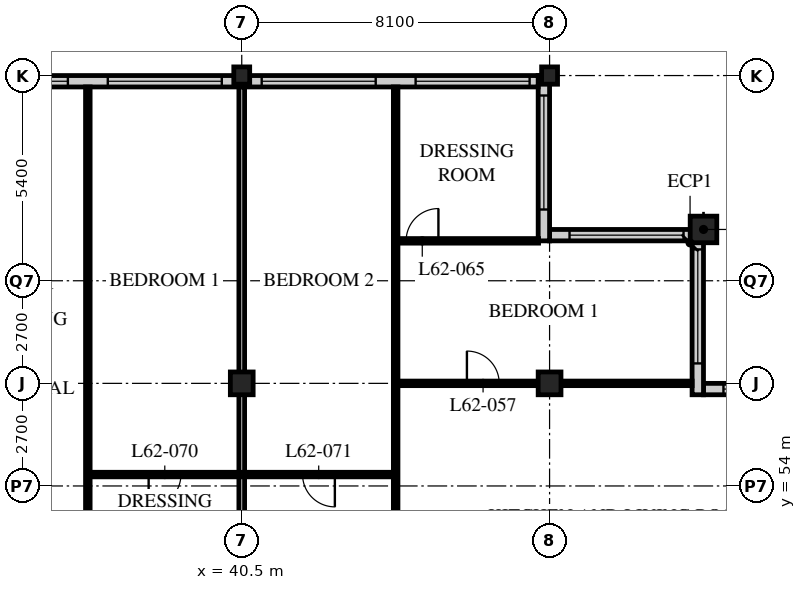
"""IFC4 building model, lengths in metres.
Left out: names, types, materials, properties, quantities, classifications, styles, units other than length and angle.
Written with IfcOpenShell. Run it as: python <this file> out.ifc"""

import sys

from ifc_helpers import new_model, si_unit, direction, frame, frame_2d, origin, origin_2d, place, context, subcontext, project, spatial, rectangle, hollow_rectangle, i_section, extrude, element, fill, save


model = new_model("IFC4")
c1 = context("Model", 3, precision=1e-05, world=origin(), true_north=direction((0.0, 1.0)))
c2 = subcontext(c1, "Body", "Model", "MODEL_VIEW")
j1 = project(units=[si_unit("LENGTHUNIT", "METRE"), si_unit("PLANEANGLEUNIT", "RADIAN")], contexts=[c1])
p1 = place(None, origin())
s1 = spatial("IfcSite", under=j1, at=p1, CompositionType="ELEMENT")
p2 = place(p1, origin())
s2 = spatial("IfcBuilding", under=s1, at=p2, CompositionType="ELEMENT")
p3 = place(p2, frame((0.0, 0.0, 242.4)))
s3 = spatial("IfcBuildingStorey", under=s2, at=p3, CompositionType="ELEMENT", Elevation=242.4)
p4 = place(p3, frame((40.5, 56.7, 0.0), z_axis=(0.0, 0.0, 1.0), x_axis=(1.0, 0.0, 0.0)))
e1 = element("IfcColumn", 1, at=p4, inside=s3, PredefinedType="COLUMN", context=c2, shape_type="SweptSolid", body=[
    extrude(hollow_rectangle(XDim=0.6, YDim=0.6, WallThickness=0.05, at=origin_2d()), origin(), (0.0, 0.0, 1.0), 3.9),
])
p5 = place(p3, frame((40.5, 64.8, 0.0), z_axis=(0.0, 0.0, 1.0), x_axis=(1.0, 0.0, 0.0)))
e2 = element("IfcColumn", 2, at=p5, inside=s3, PredefinedType="COLUMN", context=c2, shape_type="SweptSolid", body=[
    extrude(i_section(OverallWidth=0.418, OverallDepth=0.456, WebThickness=0.042, FlangeThickness=0.067, FilletRadius=0.015, at=origin_2d()), origin(), (0.0, 0.0, 1.0), 3.9),
])
p6 = place(p3, frame((48.6, 56.7, 0.0), z_axis=(0.0, 0.0, 1.0), x_axis=(1.0, 0.0, 0.0)))
e3 = element("IfcColumn", 3, at=p6, inside=s3, PredefinedType="COLUMN", context=c2, shape_type="SweptSolid", body=[
    extrude(hollow_rectangle(XDim=0.6, YDim=0.6, WallThickness=0.05, at=origin_2d()), origin(), (0.0, 0.0, 1.0), 3.9),
])
p7 = place(p3, frame((48.6, 64.8, 0.0), z_axis=(0.0, 0.0, 1.0), x_axis=(1.0, 0.0, 0.0)))
e4 = element("IfcColumn", 4, at=p7, inside=s3, PredefinedType="COLUMN", context=c2, shape_type="SweptSolid", body=[
    extrude(i_section(OverallWidth=0.418, OverallDepth=0.456, WebThickness=0.042, FlangeThickness=0.067, FilletRadius=0.015, at=origin_2d()), origin(), (0.0, 0.0, 1.0), 3.9),
])
p8 = place(p3, frame((52.65, 60.75, 0.0), z_axis=(0.0, 0.0, 1.0), x_axis=(1.0, 0.0, 0.0)))
e5 = element("IfcColumn", 5, at=p8, inside=s3, PredefinedType="COLUMN", context=c2, shape_type="SweptSolid", body=[
    extrude(hollow_rectangle(XDim=0.7, YDim=0.7, WallThickness=0.07, at=origin_2d()), origin(), (0.0, 0.0, 1.0), 3.9),
])
p9 = place(p3, frame((56.4, 56.55, 0.0), z_axis=(0.0, 0.0, 1.0), x_axis=(-1.0, 0.0, 0.0)))
e6 = element("IfcWall", 6, at=p9, inside=s3, PredefinedType="SOLIDWALL", context=c2, shape_type="SweptSolid", body=[
    extrude(rectangle(XDim=3.75, YDim=0.3, at=frame_2d((1.875, 0.0))), origin(), (0.0, 0.0, 1.0), 3.69),
])
p10 = place(p9, frame((0.225, 0.0, 0.6)))
e7 = element("IfcOpeningElement", 7, at=p10, cuts=e6, PredefinedType="OPENING", context=c2, shape_type="SweptSolid", body=[
    extrude(rectangle(XDim=3.0, YDim=2.3, at=frame_2d((1.5, 1.15))), frame((0.0, 0.16, 0.0), z_axis=(0.0, -1.0, 0.0), x_axis=(1.0, 0.0, 0.0)), (0.0, 0.0, 1.0), 0.32),
])
p11 = place(p3, frame((52.5, 56.4, 0.0), z_axis=(0.0, 0.0, 1.0), x_axis=(0.0, 1.0, 0.0)))
e8 = element("IfcWall", 8, at=p11, inside=s3, PredefinedType="SOLIDWALL", context=c2, shape_type="SweptSolid", body=[
    extrude(rectangle(XDim=4.35, YDim=0.3, at=frame_2d((2.175, 0.0))), origin(), (0.0, 0.0, 1.0), 3.69),
])
p12 = place(p11, frame((0.825, 0.0, 0.6)))
e9 = element("IfcOpeningElement", 9, at=p12, cuts=e8, PredefinedType="OPENING", context=c2, shape_type="SweptSolid", body=[
    extrude(rectangle(XDim=3.0, YDim=2.3, at=frame_2d((1.5, 1.15))), frame((0.0, 0.16, 0.0), z_axis=(0.0, -1.0, 0.0), x_axis=(1.0, 0.0, 0.0)), (0.0, 0.0, 1.0), 0.32),
])
p13 = place(p3, frame((52.35, 60.6, 0.0), z_axis=(0.0, 0.0, 1.0), x_axis=(-1.0, 0.0, 0.0)))
e10 = element("IfcWall", 10, at=p13, inside=s3, PredefinedType="SOLIDWALL", context=c2, shape_type="SweptSolid", body=[
    extrude(rectangle(XDim=3.75, YDim=0.3, at=frame_2d((1.875, 0.0))), origin(), (0.0, 0.0, 1.0), 3.69),
])
p14 = place(p13, frame((0.225, 0.0, 0.6)))
e11 = element("IfcOpeningElement", 11, at=p14, cuts=e10, PredefinedType="OPENING", context=c2, shape_type="SweptSolid", body=[
    extrude(rectangle(XDim=3.0, YDim=2.3, at=frame_2d((1.5, 1.15))), frame((0.0, 0.16, 0.0), z_axis=(0.0, -1.0, 0.0), x_axis=(1.0, 0.0, 0.0)), (0.0, 0.0, 1.0), 0.32),
])
p15 = place(p3, frame((48.45, 60.45, 0.0), z_axis=(0.0, 0.0, 1.0), x_axis=(0.0, 1.0, 0.0)))
e12 = element("IfcWall", 12, at=p15, inside=s3, PredefinedType="SOLIDWALL", context=c2, shape_type="SweptSolid", body=[
    extrude(rectangle(XDim=4.35, YDim=0.3, at=frame_2d((2.175, 0.0))), origin(), (0.0, 0.0, 1.0), 3.69),
])
p16 = place(p15, frame((0.825, 0.0, 0.6)))
e13 = element("IfcOpeningElement", 13, at=p16, cuts=e12, PredefinedType="OPENING", context=c2, shape_type="SweptSolid", body=[
    extrude(rectangle(XDim=3.0, YDim=2.3, at=frame_2d((1.5, 1.15))), frame((0.0, 0.16, 0.0), z_axis=(0.0, -1.0, 0.0), x_axis=(1.0, 0.0, 0.0)), (0.0, 0.0, 1.0), 0.32),
])
p17 = place(p3, frame((48.3, 64.65, 0.0), z_axis=(0.0, 0.0, 1.0), x_axis=(-1.0, 0.0, 0.0)))
e14 = element("IfcWall", 14, at=p17, inside=s3, PredefinedType="SOLIDWALL", context=c2, shape_type="SweptSolid", body=[
    extrude(rectangle(XDim=40.2, YDim=0.3, at=frame_2d((20.1, 0.0))), origin(), (0.0, 0.0, 1.0), 3.69),
])
p18 = place(p17, frame((0.225, 0.0, 0.6)))
e15 = element("IfcOpeningElement", 15, at=p18, cuts=e14, PredefinedType="OPENING", context=c2, shape_type="SweptSolid", body=[
    extrude(rectangle(XDim=3.0, YDim=2.3, at=frame_2d((1.5, 1.15))), frame((0.0, 0.16, 0.0), z_axis=(0.0, -1.0, 0.0), x_axis=(1.0, 0.0, 0.0)), (0.0, 0.0, 1.0), 0.32),
])
p19 = place(p17, frame((4.275, 0.0, 0.6)))
e16 = element("IfcOpeningElement", 16, at=p19, cuts=e14, PredefinedType="OPENING", context=c2, shape_type="SweptSolid", body=[
    extrude(rectangle(XDim=3.0, YDim=2.3, at=frame_2d((1.5, 1.15))), frame((0.0, 0.16, 0.0), z_axis=(0.0, -1.0, 0.0), x_axis=(1.0, 0.0, 0.0)), (0.0, 0.0, 1.0), 0.32),
])
p20 = place(p17, frame((8.325, 0.0, 0.6)))
e17 = element("IfcOpeningElement", 17, at=p20, cuts=e14, PredefinedType="OPENING", context=c2, shape_type="SweptSolid", body=[
    extrude(rectangle(XDim=3.0, YDim=2.3, at=frame_2d((1.5, 1.15))), frame((0.0, 0.16, 0.0), z_axis=(0.0, -1.0, 0.0), x_axis=(1.0, 0.0, 0.0)), (0.0, 0.0, 1.0), 0.32),
])
p21 = place(p17, frame((12.375, 0.0, 0.6)))
e18 = element("IfcOpeningElement", 18, at=p21, cuts=e14, PredefinedType="OPENING", context=c2, shape_type="SweptSolid", body=[
    extrude(rectangle(XDim=3.0, YDim=2.3, at=frame_2d((1.5, 1.15))), frame((0.0, 0.16, 0.0), z_axis=(0.0, -1.0, 0.0), x_axis=(1.0, 0.0, 0.0)), (0.0, 0.0, 1.0), 0.32),
])
p22 = place(p17, frame((16.425, 0.0, 0.6)))
e19 = element("IfcOpeningElement", 19, at=p22, cuts=e14, PredefinedType="OPENING", context=c2, shape_type="SweptSolid", body=[
    extrude(rectangle(XDim=3.0, YDim=2.3, at=frame_2d((1.5, 1.15))), frame((0.0, 0.16, 0.0), z_axis=(0.0, -1.0, 0.0), x_axis=(1.0, 0.0, 0.0)), (0.0, 0.0, 1.0), 0.32),
])
p23 = place(p17, frame((20.475, 0.0, 0.6)))
e20 = element("IfcOpeningElement", 20, at=p23, cuts=e14, PredefinedType="OPENING", context=c2, shape_type="SweptSolid", body=[
    extrude(rectangle(XDim=3.0, YDim=2.3, at=frame_2d((1.5, 1.15))), frame((0.0, 0.16, 0.0), z_axis=(0.0, -1.0, 0.0), x_axis=(1.0, 0.0, 0.0)), (0.0, 0.0, 1.0), 0.32),
])
p24 = place(p17, frame((24.525, 0.0, 0.6)))
e21 = element("IfcOpeningElement", 21, at=p24, cuts=e14, PredefinedType="OPENING", context=c2, shape_type="SweptSolid", body=[
    extrude(rectangle(XDim=3.0, YDim=2.3, at=frame_2d((1.5, 1.15))), frame((0.0, 0.16, 0.0), z_axis=(0.0, -1.0, 0.0), x_axis=(1.0, 0.0, 0.0)), (0.0, 0.0, 1.0), 0.32),
])
p25 = place(p17, frame((28.575, 0.0, 0.6)))
e22 = element("IfcOpeningElement", 22, at=p25, cuts=e14, PredefinedType="OPENING", context=c2, shape_type="SweptSolid", body=[
    extrude(rectangle(XDim=3.0, YDim=2.3, at=frame_2d((1.5, 1.15))), frame((0.0, 0.16, 0.0), z_axis=(0.0, -1.0, 0.0), x_axis=(1.0, 0.0, 0.0)), (0.0, 0.0, 1.0), 0.32),
])
p26 = place(p17, frame((32.625, 0.0, 0.6)))
e23 = element("IfcOpeningElement", 23, at=p26, cuts=e14, PredefinedType="OPENING", context=c2, shape_type="SweptSolid", body=[
    extrude(rectangle(XDim=3.0, YDim=2.3, at=frame_2d((1.5, 1.15))), frame((0.0, 0.16, 0.0), z_axis=(0.0, -1.0, 0.0), x_axis=(1.0, 0.0, 0.0)), (0.0, 0.0, 1.0), 0.32),
])
p27 = place(p17, frame((36.675, 0.0, 0.6)))
e24 = element("IfcOpeningElement", 24, at=p27, cuts=e14, PredefinedType="OPENING", context=c2, shape_type="SweptSolid", body=[
    extrude(rectangle(XDim=3.0, YDim=2.3, at=frame_2d((1.5, 1.15))), frame((0.0, 0.16, 0.0), z_axis=(0.0, -1.0, 0.0), x_axis=(1.0, 0.0, 0.0)), (0.0, 0.0, 1.0), 0.32),
])
for number, where, z_axis, x_axis in (
    (25, (36.45, 51.0, 0.0), (0.0, 0.0, 1.0), (0.0, 1.0, 0.0)),
    (26, (44.55, 51.0, 0.0), (0.0, 0.0, 1.0), (0.0, 1.0, 0.0)),
):
    element("IfcWall", number, at=place(p3, frame(where, z_axis=z_axis, x_axis=x_axis)), inside=s3, PredefinedType="PARTITIONING", context=c2, shape_type="SweptSolid", body=[
        extrude(rectangle(XDim=13.5, YDim=0.12, at=frame_2d((6.75, 0.0))), origin(), (0.0, 0.0, 1.0), 3.69),
    ])
p28 = place(p3, frame((44.55, 56.7, 0.0), z_axis=(0.0, 0.0, 1.0), x_axis=(1.0, 0.0, 0.0)))
e27 = element("IfcWall", 27, at=p28, inside=s3, PredefinedType="PARTITIONING", context=c2, shape_type="SweptSolid", body=[
    extrude(rectangle(XDim=7.8, YDim=0.12, at=frame_2d((3.9, 0.0))), origin(), (0.0, 0.0, 1.0), 2.928),
])
p29 = place(p28, frame((1.875, 0.0, 0.0)))
e28 = element("IfcOpeningElement", 28, at=p29, cuts=e27, PredefinedType="OPENING", context=c2, shape_type="SweptSolid", body=[
    extrude(rectangle(XDim=0.85, YDim=2.1, at=frame_2d((0.425, 1.05))), frame((0.0, 0.07, 0.0), z_axis=(0.0, -1.0, 0.0), x_axis=(1.0, 0.0, 0.0)), (0.0, 0.0, 1.0), 0.14),
])
p30 = place(p3, frame((40.5, 48.6, 0.0), z_axis=(0.0, 0.0, 1.0), x_axis=(0.0, 1.0, 0.0)))
e29 = element("IfcWall", 29, at=p30, inside=s3, PredefinedType="PARTITIONING", context=c2, shape_type="SweptSolid", body=[
    extrude(rectangle(XDim=15.9, YDim=0.15, at=frame_2d((7.95, 0.0))), origin(), (0.0, 0.0, 1.0), 2.928),
])
p31 = place(p3, frame((48.31, 60.45, 0.0), z_axis=(0.0, 0.0, 1.0), x_axis=(-1.0, 0.0, 0.0)))
e30 = element("IfcWall", 30, at=p31, inside=s3, PredefinedType="PARTITIONING", context=c2, shape_type="SweptSolid", body=[
    extrude(rectangle(XDim=3.76, YDim=0.12, at=frame_2d((1.88, 0.0))), origin(), (0.0, 0.0, 1.0), 3.69),
])
p32 = place(p31, frame((2.635, 0.0, 0.0)))
e31 = element("IfcOpeningElement", 31, at=p32, cuts=e30, PredefinedType="OPENING", context=c2, shape_type="SweptSolid", body=[
    extrude(rectangle(XDim=0.85, YDim=2.1, at=frame_2d((0.425, 1.05))), frame((0.0, 0.07, 0.0), z_axis=(0.0, -1.0, 0.0), x_axis=(1.0, 0.0, 0.0)), (0.0, 0.0, 1.0), 0.14),
])
p33 = place(p3, frame((36.45, 54.3, 0.0), z_axis=(0.0, 0.0, 1.0), x_axis=(1.0, 0.0, 0.0)))
e32 = element("IfcWall", 32, at=p33, inside=s3, PredefinedType="PARTITIONING", context=c2, shape_type="SweptSolid", body=[
    extrude(rectangle(XDim=8.1, YDim=0.12, at=frame_2d((4.05, 0.0))), origin(), (0.0, 0.0, 1.0), 3.69),
])
p34 = place(p33, frame((1.6, 0.0, 0.0)))
e33 = element("IfcOpeningElement", 33, at=p34, cuts=e32, PredefinedType="OPENING", context=c2, shape_type="SweptSolid", body=[
    extrude(rectangle(XDim=0.85, YDim=2.1, at=frame_2d((0.425, 1.05))), frame((0.0, 0.07, 0.0), z_axis=(0.0, -1.0, 0.0), x_axis=(1.0, 0.0, 0.0)), (0.0, 0.0, 1.0), 0.14),
])
p35 = place(p33, frame((5.65, 0.0, 0.0)))
e34 = element("IfcOpeningElement", 34, at=p35, cuts=e32, PredefinedType="OPENING", context=c2, shape_type="SweptSolid", body=[
    extrude(rectangle(XDim=0.85, YDim=2.1, at=frame_2d((0.425, 1.05))), frame((0.0, 0.07, 0.0), z_axis=(0.0, -1.0, 0.0), x_axis=(1.0, 0.0, 0.0)), (0.0, 0.0, 1.0), 0.14),
])
p36 = place(p10, origin())
e35 = element("IfcWindow", 35, at=p36, inside=s3, PartitioningType="SINGLE_PANEL", PredefinedType="WINDOW", context=c2, shape_type="SweptSolid", body=[
    extrude(rectangle(XDim=3.0, YDim=2.3, at=frame_2d((1.5, 1.15))), frame((0.0, 0.03, 0.0), z_axis=(0.0, -1.0, 0.0), x_axis=(1.0, 0.0, 0.0)), (0.0, 0.0, 1.0), 0.06),
])
fill(e7, e35)
p37 = place(p12, origin())
e36 = element("IfcWindow", 36, at=p37, inside=s3, PartitioningType="SINGLE_PANEL", PredefinedType="WINDOW", context=c2, shape_type="SweptSolid", body=[
    extrude(rectangle(XDim=3.0, YDim=2.3, at=frame_2d((1.5, 1.15))), frame((0.0, 0.03, 0.0), z_axis=(0.0, -1.0, 0.0), x_axis=(1.0, 0.0, 0.0)), (0.0, 0.0, 1.0), 0.06),
])
fill(e9, e36)
p38 = place(p14, origin())
e37 = element("IfcWindow", 37, at=p38, inside=s3, PartitioningType="SINGLE_PANEL", PredefinedType="WINDOW", context=c2, shape_type="SweptSolid", body=[
    extrude(rectangle(XDim=3.0, YDim=2.3, at=frame_2d((1.5, 1.15))), frame((0.0, 0.03, 0.0), z_axis=(0.0, -1.0, 0.0), x_axis=(1.0, 0.0, 0.0)), (0.0, 0.0, 1.0), 0.06),
])
fill(e11, e37)
p39 = place(p16, origin())
e38 = element("IfcWindow", 38, at=p39, inside=s3, PartitioningType="SINGLE_PANEL", PredefinedType="WINDOW", context=c2, shape_type="SweptSolid", body=[
    extrude(rectangle(XDim=3.0, YDim=2.3, at=frame_2d((1.5, 1.15))), frame((0.0, 0.03, 0.0), z_axis=(0.0, -1.0, 0.0), x_axis=(1.0, 0.0, 0.0)), (0.0, 0.0, 1.0), 0.06),
])
fill(e13, e38)
p40 = place(p18, origin())
e39 = element("IfcWindow", 39, at=p40, inside=s3, PartitioningType="SINGLE_PANEL", PredefinedType="WINDOW", context=c2, shape_type="SweptSolid", body=[
    extrude(rectangle(XDim=3.0, YDim=2.3, at=frame_2d((1.5, 1.15))), frame((0.0, 0.03, 0.0), z_axis=(0.0, -1.0, 0.0), x_axis=(1.0, 0.0, 0.0)), (0.0, 0.0, 1.0), 0.06),
])
fill(e15, e39)
p41 = place(p19, origin())
e40 = element("IfcWindow", 40, at=p41, inside=s3, PartitioningType="SINGLE_PANEL", PredefinedType="WINDOW", context=c2, shape_type="SweptSolid", body=[
    extrude(rectangle(XDim=3.0, YDim=2.3, at=frame_2d((1.5, 1.15))), frame((0.0, 0.03, 0.0), z_axis=(0.0, -1.0, 0.0), x_axis=(1.0, 0.0, 0.0)), (0.0, 0.0, 1.0), 0.06),
])
fill(e16, e40)
p42 = place(p20, origin())
e41 = element("IfcWindow", 41, at=p42, inside=s3, PartitioningType="SINGLE_PANEL", PredefinedType="WINDOW", context=c2, shape_type="SweptSolid", body=[
    extrude(rectangle(XDim=3.0, YDim=2.3, at=frame_2d((1.5, 1.15))), frame((0.0, 0.03, 0.0), z_axis=(0.0, -1.0, 0.0), x_axis=(1.0, 0.0, 0.0)), (0.0, 0.0, 1.0), 0.06),
])
fill(e17, e41)
p43 = place(p21, origin())
e42 = element("IfcWindow", 42, at=p43, inside=s3, PartitioningType="SINGLE_PANEL", PredefinedType="WINDOW", context=c2, shape_type="SweptSolid", body=[
    extrude(rectangle(XDim=3.0, YDim=2.3, at=frame_2d((1.5, 1.15))), frame((0.0, 0.03, 0.0), z_axis=(0.0, -1.0, 0.0), x_axis=(1.0, 0.0, 0.0)), (0.0, 0.0, 1.0), 0.06),
])
fill(e18, e42)
p44 = place(p29, origin())
e43 = element("IfcDoor", 43, at=p44, inside=s3, OperationType="SINGLE_SWING_LEFT", PredefinedType="DOOR", context=c2, shape_type="SweptSolid", body=[
    extrude(rectangle(XDim=0.85, YDim=2.1, at=frame_2d((0.425, 1.05))), frame((0.0, 0.025, 0.0), z_axis=(0.0, -1.0, 0.0), x_axis=(1.0, 0.0, 0.0)), (0.0, 0.0, 1.0), 0.05),
])
fill(e28, e43)
p45 = place(p32, origin())
e44 = element("IfcDoor", 44, at=p45, inside=s3, OperationType="SINGLE_SWING_RIGHT", PredefinedType="DOOR", context=c2, shape_type="SweptSolid", body=[
    extrude(rectangle(XDim=0.85, YDim=2.1, at=frame_2d((0.425, 1.05))), frame((0.0, 0.025, 0.0), z_axis=(0.0, -1.0, 0.0), x_axis=(1.0, 0.0, 0.0)), (0.0, 0.0, 1.0), 0.05),
])
fill(e31, e44)
p46 = place(p34, origin())
e45 = element("IfcDoor", 45, at=p46, inside=s3, OperationType="SINGLE_SWING_RIGHT", PredefinedType="DOOR", context=c2, shape_type="SweptSolid", body=[
    extrude(rectangle(XDim=0.85, YDim=2.1, at=frame_2d((0.425, 1.05))), frame((0.0, 0.025, 0.0), z_axis=(0.0, -1.0, 0.0), x_axis=(1.0, 0.0, 0.0)), (0.0, 0.0, 1.0), 0.05),
])
fill(e33, e45)
p47 = place(p35, origin())
e46 = element("IfcDoor", 46, at=p47, inside=s3, OperationType="SINGLE_SWING_LEFT", PredefinedType="DOOR", context=c2, shape_type="SweptSolid", body=[
    extrude(rectangle(XDim=0.85, YDim=2.1, at=frame_2d((0.425, 1.05))), frame((0.0, 0.025, 0.0), z_axis=(0.0, -1.0, 0.0), x_axis=(1.0, 0.0, 0.0)), (0.0, 0.0, 1.0), 0.05),
])
fill(e34, e46)
save(model, sys.argv[1])
